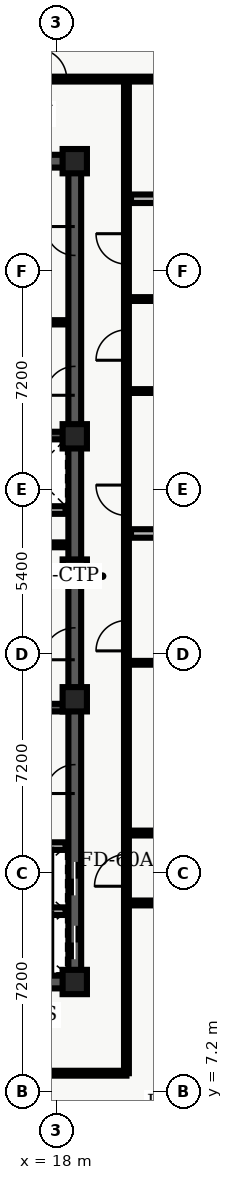
"""IFC4 building model, lengths in metres.
Left out: names, types, materials, properties, quantities, classifications, styles, units other than length and angle.
Written with IfcOpenShell. Run it as: python <this file> out.ifc"""

import sys

from ifc_helpers import new_model, entity, si_unit, converted_unit, direction, frame, origin_with_axes, origin_2d_with_axis, place, context, subcontext, project, spatial, polyline, rectangle, outline, extrude, element, fill, save


model = new_model("IFC4")
c1 = context("Model", 3, precision=1e-05, world=origin_with_axes(), true_north=direction((0.0, 1.0)))
c2 = subcontext(c1, "Body", "Model", "MODEL_VIEW")
j1 = project(units=[si_unit("LENGTHUNIT", "METRE"), converted_unit("PLANEANGLEUNIT", "DEGREE", entity("IfcPlaneAngleMeasure", 0.017), si_unit("PLANEANGLEUNIT", "RADIAN"), dimensions=[0, 0, 0, 0, 0, 0, 0])], contexts=[c1])
p1 = place(None, origin_with_axes())
s1 = spatial("IfcSite", under=j1, at=p1, CompositionType="ELEMENT")
p2 = place(p1, origin_with_axes())
s2 = spatial("IfcBuilding", under=s1, at=p2, CompositionType="ELEMENT")
p3 = place(p2, frame((0.0, 0.0, 276.3), z_axis=(0.0, 0.0, 1.0), x_axis=(1.0, 0.0, 0.0)))
s3 = spatial("IfcBuildingStorey", under=s2, at=p3, CompositionType="ELEMENT", Elevation=276.3)
p4 = place(p3, frame((11.4, 10.8, 0.0), z_axis=(0.0, 0.0, 1.0), x_axis=(1.0, 0.0, 0.0)))
e1 = element("IfcWall", 1, at=p4, inside=s3, PredefinedType="SHEAR", context=c2, shape_type="SweptSolid", body=[
    extrude(outline(polyline([(0.0, -0.21), (7.2, -0.21), (7.2, 0.21), (0.0, 0.21), (0.0, -0.21)])), origin_with_axes(), (0.0, 0.0, 1.0), 3.66),
])
p5 = place(p4, frame((2.625, 0.0, 0.0), z_axis=(0.0, 0.0, 1.0), x_axis=(1.0, 0.0, 0.0)))
e2 = element("IfcOpeningElement", 2, at=p5, cuts=e1, PredefinedType="OPENING", context=c2, shape_type="SweptSolid", body=[
    extrude(rectangle(XDim=1.05, YDim=0.44, at=origin_2d_with_axis()), origin_with_axes(), (0.0, 0.0, 1.0), 2.15),
])
p6 = place(p3, frame((11.4, 37.8, 0.0), z_axis=(0.0, 0.0, 1.0), x_axis=(1.0, 0.0, 0.0)))
e3 = element("IfcWall", 3, at=p6, inside=s3, PredefinedType="SHEAR", context=c2, shape_type="SweptSolid", body=[
    extrude(outline(polyline([(0.0, -0.21), (7.2, -0.21), (7.2, 0.21), (0.0, 0.21), (0.0, -0.21)])), origin_with_axes(), (0.0, 0.0, 1.0), 3.66),
])
p7 = place(p6, frame((2.625, 0.0, 0.0), z_axis=(0.0, 0.0, 1.0), x_axis=(1.0, 0.0, 0.0)))
e4 = element("IfcOpeningElement", 4, at=p7, cuts=e3, PredefinedType="OPENING", context=c2, shape_type="SweptSolid", body=[
    extrude(rectangle(XDim=1.05, YDim=0.44, at=origin_2d_with_axis()), origin_with_axes(), (0.0, 0.0, 1.0), 2.15),
])
p8 = place(p3, frame((18.6, 10.8, 0.0), z_axis=(0.0, 0.0, 1.0), x_axis=(0.0, 1.0, 0.0)))
e5 = element("IfcWall", 5, at=p8, inside=s3, PredefinedType="SHEAR", context=c2, shape_type="SweptSolid", body=[
    extrude(outline(polyline([(0.0, -0.21), (13.5, -0.21), (13.5, 0.21), (0.0, 0.21), (0.0, -0.21)])), origin_with_axes(), (0.0, 0.0, 1.0), 3.66),
])
p9 = place(p8, frame((1.3, 0.0, 0.0), z_axis=(0.0, 0.0, 1.0), x_axis=(1.0, 0.0, 0.0)))
e6 = element("IfcOpeningElement", 6, at=p9, cuts=e5, PredefinedType="OPENING", context=c2, shape_type="SweptSolid", body=[
    extrude(rectangle(XDim=1.1, YDim=0.44, at=origin_2d_with_axis()), origin_with_axes(), (0.0, 0.0, 1.0), 2.15),
])
p10 = place(p8, frame((3.4, 0.0, 0.0), z_axis=(0.0, 0.0, 1.0), x_axis=(1.0, 0.0, 0.0)))
e7 = element("IfcOpeningElement", 7, at=p10, cuts=e5, PredefinedType="OPENING", context=c2, shape_type="SweptSolid", body=[
    extrude(rectangle(XDim=1.1, YDim=0.44, at=origin_2d_with_axis()), origin_with_axes(), (0.0, 0.0, 1.0), 2.15),
])
p11 = place(p8, frame((11.125, 0.0, 0.0), z_axis=(0.0, 0.0, 1.0), x_axis=(1.0, 0.0, 0.0)))
e8 = element("IfcOpeningElement", 8, at=p11, cuts=e5, PredefinedType="OPENING", context=c2, shape_type="SweptSolid", body=[
    extrude(rectangle(XDim=1.05, YDim=0.44, at=origin_2d_with_axis()), origin_with_axes(), (0.0, 0.0, 1.0), 2.15),
])
p12 = place(p8, frame((6.675, 0.0, 0.0), z_axis=(0.0, 0.0, 1.0), x_axis=(1.0, 0.0, 0.0)))
e9 = element("IfcOpeningElement", 9, at=p12, cuts=e5, PredefinedType="OPENING", context=c2, shape_type="SweptSolid", body=[
    extrude(rectangle(XDim=0.95, YDim=0.44, at=origin_2d_with_axis()), origin_with_axes(), (0.0, 0.0, 1.0), 2.15),
])
p13 = place(p3, frame((18.6, 24.3, 0.0), z_axis=(0.0, 0.0, 1.0), x_axis=(0.0, 1.0, 0.0)))
e10 = element("IfcWall", 10, at=p13, inside=s3, PredefinedType="SHEAR", context=c2, shape_type="SweptSolid", body=[
    extrude(outline(polyline([(0.0, -0.21), (13.5, -0.21), (13.5, 0.21), (0.0, 0.21), (0.0, -0.21)])), origin_with_axes(), (0.0, 0.0, 1.0), 3.66),
])
p14 = place(p13, frame((6.275, 0.0, 0.0), z_axis=(0.0, 0.0, 1.0), x_axis=(1.0, 0.0, 0.0)))
e11 = element("IfcOpeningElement", 11, at=p14, cuts=e10, PredefinedType="OPENING", context=c2, shape_type="SweptSolid", body=[
    extrude(rectangle(XDim=0.95, YDim=0.44, at=origin_2d_with_axis()), origin_with_axes(), (0.0, 0.0, 1.0), 2.15),
])
p15 = place(p13, frame((10.875, 0.0, 0.0), z_axis=(0.0, 0.0, 1.0), x_axis=(1.0, 0.0, 0.0)))
e12 = element("IfcOpeningElement", 12, at=p15, cuts=e10, PredefinedType="OPENING", context=c2, shape_type="SweptSolid", body=[
    extrude(rectangle(XDim=0.95, YDim=0.44, at=origin_2d_with_axis()), origin_with_axes(), (0.0, 0.0, 1.0), 2.15),
])
for number, where, z_axis, x_axis in (
    (13, (11.61, 19.825, 0.0), (0.0, 0.0, 1.0), (1.0, 0.0, 0.0)),
    (14, (11.61, 28.775, 0.0), (0.0, 0.0, 1.0), (1.0, 0.0, 0.0)),
):
    element("IfcWall", number, at=place(p3, frame(where, z_axis=z_axis, x_axis=x_axis)), inside=s3, PredefinedType="SHEAR", context=c2, shape_type="SweptSolid", body=[
        extrude(outline(polyline([(0.0, -0.125), (6.78, -0.125), (6.78, 0.125), (0.0, 0.125), (0.0, -0.125)])), origin_with_axes(), (0.0, 0.0, 1.0), 3.66),
    ])
p16 = place(p3, frame((11.7, 24.1, 0.0), z_axis=(0.0, 0.0, 1.0), x_axis=(1.0, 0.0, 0.0)))
e15 = element("IfcWall", 15, at=p16, inside=s3, PredefinedType="SOLIDWALL", context=c2, shape_type="SweptSolid", body=[
    extrude(outline(polyline([(0.0, -0.125), (6.6, -0.125), (6.6, 0.125), (0.0, 0.125), (0.0, -0.125)])), origin_with_axes(), (0.0, 0.0, 1.0), 2.7),
])
p17 = place(p16, frame((3.75, 0.0, 0.0), z_axis=(0.0, 0.0, 1.0), x_axis=(1.0, 0.0, 0.0)))
e16 = element("IfcOpeningElement", 16, at=p17, cuts=e15, PredefinedType="OPENING", context=c2, shape_type="SweptSolid", body=[
    extrude(rectangle(XDim=0.9, YDim=0.27, at=origin_2d_with_axis()), origin_with_axes(), (0.0, 0.0, 1.0), 2.15),
])
p18 = place(p3, frame((11.7, 26.325, 0.0), z_axis=(0.0, 0.0, 1.0), x_axis=(1.0, 0.0, 0.0)))
e17 = element("IfcWall", 17, at=p18, inside=s3, PredefinedType="SOLIDWALL", context=c2, shape_type="SweptSolid", body=[
    extrude(outline(polyline([(0.0, -0.125), (6.6, -0.125), (6.6, 0.125), (0.0, 0.125), (0.0, -0.125)])), origin_with_axes(), (0.0, 0.0, 1.0), 2.7),
])
p19 = place(p18, frame((3.5, 0.0, 0.0), z_axis=(0.0, 0.0, 1.0), x_axis=(1.0, 0.0, 0.0)))
e18 = element("IfcOpeningElement", 18, at=p19, cuts=e17, PredefinedType="OPENING", context=c2, shape_type="SweptSolid", body=[
    extrude(rectangle(XDim=0.9, YDim=0.27, at=origin_2d_with_axis()), origin_with_axes(), (0.0, 0.0, 1.0), 2.15),
])
for number, where, z_axis, x_axis in (
    (19, (18.6, 10.8, 0.0), (0.0, 0.0, 1.0), (1.0, 0.0, 0.0)),
    (20, (18.6, 20.1, 0.0), (0.0, 0.0, 1.0), (1.0, 0.0, 0.0)),
    (21, (18.6, 24.3, 0.0), (0.0, 0.0, 1.0), (1.0, 0.0, 0.0)),
    (22, (18.6, 28.75, 0.0), (0.0, 0.0, 1.0), (1.0, 0.0, 0.0)),
    (23, (18.6, 37.8, 0.0), (0.0, 0.0, 1.0), (1.0, 0.0, 0.0)),
):
    element("IfcColumn", number, at=place(p3, frame(where, z_axis=z_axis, x_axis=x_axis)), inside=s3, PredefinedType="COLUMN", context=c2, shape_type="SweptSolid", body=[
        extrude(rectangle(XDim=0.8, YDim=0.8, at=origin_2d_with_axis()), origin_with_axes(), (0.0, 0.0, 1.0), 3.9),
    ])
p20 = place(p3, frame((14.62, 25.18, 0.0), z_axis=(0.0, 0.0, 1.0), x_axis=(1.0, 0.0, 0.0)))
e24 = element("IfcWall", 24, at=p20, inside=s3, PredefinedType="PARTITIONING", context=c2, shape_type="SweptSolid", body=[
    extrude(outline(polyline([(0.0, -0.08), (3.68, -0.08), (3.68, 0.08), (0.0, 0.08), (0.0, -0.08)])), origin_with_axes(), (0.0, 0.0, 1.0), 2.7),
])
p21 = place(p20, frame((1.95, 0.0, 0.0), z_axis=(0.0, 0.0, 1.0), x_axis=(1.0, 0.0, 0.0)))
e25 = element("IfcOpeningElement", 25, at=p21, cuts=e24, PredefinedType="OPENING", context=c2, shape_type="SweptSolid", body=[
    extrude(rectangle(XDim=0.9, YDim=0.18, at=origin_2d_with_axis()), origin_with_axes(), (0.0, 0.0, 1.0), 2.15),
])
for number, where, z_axis, x_axis in (
    (26, (15.84, 13.13, 0.0), (0.0, 0.0, 1.0), (1.0, 0.0, 0.0)),
    (27, (15.84, 15.27, 0.0), (0.0, 0.0, 1.0), (1.0, 0.0, 0.0)),
):
    element("IfcWall", number, at=place(p3, frame(where, z_axis=z_axis, x_axis=x_axis)), inside=s3, PredefinedType="SOLIDWALL", context=c2, shape_type="SweptSolid", body=[
        extrude(outline(polyline([(0.0, -0.125), (2.46, -0.125), (2.46, 0.125), (0.0, 0.125), (0.0, -0.125)])), origin_with_axes(), (0.0, 0.0, 1.0), 2.7),
    ])
p22 = place(p3, frame((15.84, 32.5, 0.0), z_axis=(0.0, 0.0, 1.0), x_axis=(1.0, 0.0, 0.0)))
e28 = element("IfcWall", 28, at=p22, inside=s3, PredefinedType="PARTITIONING", context=c2, shape_type="SweptSolid", body=[
    extrude(outline(polyline([(0.0, -0.07), (2.46, -0.07), (2.46, 0.07), (0.0, 0.07), (0.0, -0.07)])), origin_with_axes(), (0.0, 0.0, 1.0), 2.7),
])
p23 = place(p3, frame((8.135, 7.8, 0.0), z_axis=(0.0, 0.0, 1.0), x_axis=(1.0, 0.0, 0.0)))
e29 = element("IfcWall", 29, at=p23, inside=s3, PredefinedType="PARTITIONING", context=c2, shape_type="SweptSolid", body=[
    extrude(outline(polyline([(0.0, -0.08), (12.165, -0.08), (12.165, 0.08), (0.0, 0.08), (0.0, -0.08)])), origin_with_axes(), (0.0, 0.0, 1.0), 2.7),
])
p24 = place(p23, frame((6.065, 0.0, 0.0), z_axis=(0.0, 0.0, 1.0), x_axis=(1.0, 0.0, 0.0)))
e30 = element("IfcOpeningElement", 30, at=p24, cuts=e29, PredefinedType="OPENING", context=c2, shape_type="SweptSolid", body=[
    extrude(rectangle(XDim=1.0, YDim=0.18, at=origin_2d_with_axis()), origin_with_axes(), (0.0, 0.0, 1.0), 2.15),
])
p25 = place(p3, frame((8.135, 40.5, 0.0), z_axis=(0.0, 0.0, 1.0), x_axis=(1.0, 0.0, 0.0)))
e31 = element("IfcWall", 31, at=p25, inside=s3, PredefinedType="PARTITIONING", context=c2, shape_type="SweptSolid", body=[
    extrude(outline(polyline([(0.0, -0.08), (23.93, -0.08), (23.93, 0.08), (0.0, 0.08), (0.0, -0.08)])), origin_with_axes(), (0.0, 0.0, 1.0), 2.7),
])
p26 = place(p25, frame((0.876, 0.0, 0.0), z_axis=(0.0, 0.0, 1.0), x_axis=(1.0, 0.0, 0.0)))
e32 = element("IfcOpeningElement", 32, at=p26, cuts=e31, PredefinedType="OPENING", context=c2, shape_type="SweptSolid", body=[
    extrude(rectangle(XDim=1.0, YDim=0.18, at=origin_2d_with_axis()), origin_with_axes(), (0.0, 0.0, 1.0), 2.15),
])
p27 = place(p25, frame((5.457, 0.0, 0.0), z_axis=(0.0, 0.0, 1.0), x_axis=(1.0, 0.0, 0.0)))
e33 = element("IfcOpeningElement", 33, at=p27, cuts=e31, PredefinedType="OPENING", context=c2, shape_type="SweptSolid", body=[
    extrude(rectangle(XDim=1.0, YDim=0.18, at=origin_2d_with_axis()), origin_with_axes(), (0.0, 0.0, 1.0), 2.15),
])
p28 = place(p25, frame((9.7, 0.0, 0.0), z_axis=(0.0, 0.0, 1.0), x_axis=(1.0, 0.0, 0.0)))
e34 = element("IfcOpeningElement", 34, at=p28, cuts=e31, PredefinedType="OPENING", context=c2, shape_type="SweptSolid", body=[
    extrude(rectangle(XDim=1.0, YDim=0.18, at=origin_2d_with_axis()), origin_with_axes(), (0.0, 0.0, 1.0), 2.15),
])
p29 = place(p3, frame((20.3, 7.8, 0.0), z_axis=(0.0, 0.0, 1.0), x_axis=(0.0, 1.0, 0.0)))
e35 = element("IfcWall", 35, at=p29, inside=s3, PredefinedType="PARTITIONING", context=c2, shape_type="SweptSolid", body=[
    extrude(outline(polyline([(0.0, -0.08), (32.7, -0.08), (32.7, 0.08), (0.0, 0.08), (0.0, -0.08)])), origin_with_axes(), (0.0, 0.0, 1.0), 2.7),
])
p30 = place(p29, frame((14.392, 0.0, 0.0), z_axis=(0.0, 0.0, 1.0), x_axis=(1.0, 0.0, 0.0)))
e36 = element("IfcOpeningElement", 36, at=p30, cuts=e35, PredefinedType="OPENING", context=c2, shape_type="SweptSolid", body=[
    extrude(rectangle(XDim=1.0, YDim=0.18, at=origin_2d_with_axis()), origin_with_axes(), (0.0, 0.0, 1.0), 2.15),
])
p31 = place(p29, frame((18.846, 0.0, 0.0), z_axis=(0.0, 0.0, 1.0), x_axis=(1.0, 0.0, 0.0)))
e37 = element("IfcOpeningElement", 37, at=p31, cuts=e35, PredefinedType="OPENING", context=c2, shape_type="SweptSolid", body=[
    extrude(rectangle(XDim=1.0, YDim=0.18, at=origin_2d_with_axis()), origin_with_axes(), (0.0, 0.0, 1.0), 2.15),
])
p32 = place(p29, frame((23.952, 0.0, 0.0), z_axis=(0.0, 0.0, 1.0), x_axis=(1.0, 0.0, 0.0)))
e38 = element("IfcOpeningElement", 38, at=p32, cuts=e35, PredefinedType="OPENING", context=c2, shape_type="SweptSolid", body=[
    extrude(rectangle(XDim=1.0, YDim=0.18, at=origin_2d_with_axis()), origin_with_axes(), (0.0, 0.0, 1.0), 2.15),
])
p33 = place(p29, frame((27.114, 0.0, 0.0), z_axis=(0.0, 0.0, 1.0), x_axis=(1.0, 0.0, 0.0)))
e39 = element("IfcOpeningElement", 39, at=p33, cuts=e35, PredefinedType="OPENING", context=c2, shape_type="SweptSolid", body=[
    extrude(rectangle(XDim=1.0, YDim=0.18, at=origin_2d_with_axis()), origin_with_axes(), (0.0, 0.0, 1.0), 2.15),
])
p34 = place(p29, frame((6.675, 0.0, 0.0), z_axis=(0.0, 0.0, 1.0), x_axis=(1.0, 0.0, 0.0)))
e40 = element("IfcOpeningElement", 40, at=p34, cuts=e35, PredefinedType="OPENING", context=c2, shape_type="SweptSolid", body=[
    extrude(rectangle(XDim=1.05, YDim=0.18, at=origin_2d_with_axis()), origin_with_axes(), (0.0, 0.0, 1.0), 2.15),
])
p35 = place(p3, frame((20.45, 25.554, 0.0), z_axis=(0.0, 0.0, 1.0), x_axis=(1.0, 0.0, 0.0)))
e41 = element("IfcWall", 41, at=p35, inside=s3, PredefinedType="PARTITIONING", context=c2, shape_type="SweptSolid", body=[
    extrude(outline(polyline([(0.0, -0.14), (11.615, -0.14), (11.615, 0.14), (0.0, 0.14), (0.0, -0.14)])), origin_with_axes(), (0.0, 0.0, 1.0), 2.7),
])
for number, where, z_axis, x_axis in (
    (42, (20.45, 30.239, 0.0), (0.0, 0.0, 1.0), (1.0, 0.0, 0.0)),
    (43, (20.45, 33.265, 0.0), (0.0, 0.0, 1.0), (1.0, 0.0, 0.0)),
):
    element("IfcWall", number, at=place(p3, frame(where, z_axis=z_axis, x_axis=x_axis)), inside=s3, PredefinedType="PARTITIONING", context=c2, shape_type="SweptSolid", body=[
        extrude(outline(polyline([(0.0, -0.062), (11.615, -0.062), (11.615, 0.062), (0.0, 0.062), (0.0, -0.062)])), origin_with_axes(), (0.0, 0.0, 1.0), 2.7),
    ])
p36 = place(p3, frame((20.45, 36.564, 0.0), z_axis=(0.0, 0.0, 1.0), x_axis=(1.0, 0.0, 0.0)))
e44 = element("IfcWall", 44, at=p36, inside=s3, PredefinedType="PARTITIONING", context=c2, shape_type="SweptSolid", body=[
    extrude(outline(polyline([(0.0, -0.14), (11.615, -0.14), (11.615, 0.14), (0.0, 0.14), (0.0, -0.14)])), origin_with_axes(), (0.0, 0.0, 1.0), 2.7),
])
p37 = place(p36, frame((5.785, 0.0, 0.0), z_axis=(0.0, 0.0, 1.0), x_axis=(1.0, 0.0, 0.0)))
e45 = element("IfcOpeningElement", 45, at=p37, cuts=e44, PredefinedType="OPENING", context=c2, shape_type="SweptSolid", body=[
    extrude(rectangle(XDim=0.95, YDim=0.3, at=origin_2d_with_axis()), origin_with_axes(), (0.0, 0.0, 1.0), 2.15),
])
p38 = place(p3, frame((20.3, 13.4, 0.0), z_axis=(0.0, 0.0, 1.0), x_axis=(1.0, 0.0, 0.0)))
e46 = element("IfcWall", 46, at=p38, inside=s3, PredefinedType="PARTITIONING", context=c2, shape_type="SweptSolid", body=[
    extrude(outline(polyline([(0.0, -0.08), (15.45, -0.08), (15.45, 0.08), (0.0, 0.08), (0.0, -0.08)])), origin_with_axes(), (0.0, 0.0, 1.0), 2.7),
])
p39 = place(p38, frame((2.34, 0.0, 0.0), z_axis=(0.0, 0.0, 1.0), x_axis=(1.0, 0.0, 0.0)))
e47 = element("IfcOpeningElement", 47, at=p39, cuts=e46, PredefinedType="OPENING", context=c2, shape_type="SweptSolid", body=[
    extrude(rectangle(XDim=1.0, YDim=0.18, at=origin_2d_with_axis()), origin_with_axes(), (0.0, 0.0, 1.0), 2.15),
])
p40 = place(p38, frame((7.011, 0.0, 0.0), z_axis=(0.0, 0.0, 1.0), x_axis=(1.0, 0.0, 0.0)))
e48 = element("IfcOpeningElement", 48, at=p40, cuts=e46, PredefinedType="OPENING", context=c2, shape_type="SweptSolid", body=[
    extrude(rectangle(XDim=1.0, YDim=0.18, at=origin_2d_with_axis()), origin_with_axes(), (0.0, 0.0, 1.0), 2.15),
])
p41 = place(p38, frame((12.445, 0.0, 0.0), z_axis=(0.0, 0.0, 1.0), x_axis=(1.0, 0.0, 0.0)))
e49 = element("IfcOpeningElement", 49, at=p41, cuts=e46, PredefinedType="OPENING", context=c2, shape_type="SweptSolid", body=[
    extrude(rectangle(XDim=1.2, YDim=0.18, at=origin_2d_with_axis()), origin_with_axes(), (0.0, 0.0, 1.0), 2.2),
])
p42 = place(p3, frame((20.3, 15.7, 0.0), z_axis=(0.0, 0.0, 1.0), x_axis=(1.0, 0.0, 0.0)))
e50 = element("IfcWall", 50, at=p42, inside=s3, PredefinedType="PARTITIONING", context=c2, shape_type="SweptSolid", body=[
    extrude(outline(polyline([(0.0, -0.08), (15.45, -0.08), (15.45, 0.08), (0.0, 0.08), (0.0, -0.08)])), origin_with_axes(), (0.0, 0.0, 1.0), 2.7),
])
p43 = place(p42, frame((7.775, 0.0, 0.0), z_axis=(0.0, 0.0, 1.0), x_axis=(1.0, 0.0, 0.0)))
e51 = element("IfcOpeningElement", 51, at=p43, cuts=e50, PredefinedType="OPENING", context=c2, shape_type="SweptSolid", body=[
    extrude(rectangle(XDim=1.0, YDim=0.18, at=origin_2d_with_axis()), origin_with_axes(), (0.0, 0.0, 1.0), 2.15),
])
p44 = place(p3, frame((20.3, 21.3, 0.0), z_axis=(0.0, 0.0, 1.0), x_axis=(1.0, 0.0, 0.0)))
e52 = element("IfcWall", 52, at=p44, inside=s3, PredefinedType="PARTITIONING", context=c2, shape_type="SweptSolid", body=[
    extrude(outline(polyline([(0.0, -0.062), (11.765, -0.062), (11.765, 0.062), (0.0, 0.062), (0.0, -0.062)])), origin_with_axes(), (0.0, 0.0, 1.0), 2.7),
])
p45 = place(p8, frame((1.3, 0.0, 0.0), z_axis=(0.0, 0.0, 1.0), x_axis=(1.0, 0.0, 0.0)))
e53 = element("IfcDoor", 53, at=p45, inside=s3, OperationType="SLIDING_TO_LEFT", PredefinedType="DOOR", context=c2, shape_type="SweptSolid", body=[
    extrude(rectangle(XDim=1.1, YDim=0.09, at=origin_2d_with_axis()), origin_with_axes(), (0.0, 0.0, 1.0), 2.15),
])
fill(e6, e53)
p46 = place(p8, frame((3.4, 0.0, 0.0), z_axis=(0.0, 0.0, 1.0), x_axis=(1.0, 0.0, 0.0)))
e54 = element("IfcDoor", 54, at=p46, inside=s3, OperationType="SLIDING_TO_RIGHT", PredefinedType="DOOR", context=c2, shape_type="SweptSolid", body=[
    extrude(rectangle(XDim=1.1, YDim=0.09, at=origin_2d_with_axis()), origin_with_axes(), (0.0, 0.0, 1.0), 2.15),
])
fill(e7, e54)
p47 = place(p8, frame((11.125, 0.0, 0.0), z_axis=(0.0, 0.0, 1.0), x_axis=(1.0, 0.0, 0.0)))
e55 = element("IfcDoor", 55, at=p47, inside=s3, OperationType="SINGLE_SWING_LEFT", PredefinedType="DOOR", context=c2, shape_type="SweptSolid", body=[
    extrude(rectangle(XDim=1.05, YDim=0.09, at=origin_2d_with_axis()), origin_with_axes(), (0.0, 0.0, 1.0), 2.15),
])
fill(e8, e55)
p48 = place(p8, frame((6.675, 0.0, 0.0), z_axis=(0.0, 0.0, 1.0), x_axis=(1.0, 0.0, 0.0)))
e56 = element("IfcDoor", 56, at=p48, inside=s3, OperationType="SINGLE_SWING_LEFT", PredefinedType="DOOR", context=c2, shape_type="SweptSolid", body=[
    extrude(rectangle(XDim=0.95, YDim=0.09, at=origin_2d_with_axis()), origin_with_axes(), (0.0, 0.0, 1.0), 2.15),
])
fill(e9, e56)
p49 = place(p13, frame((6.275, 0.0, 0.0), z_axis=(0.0, 0.0, 1.0), x_axis=(1.0, 0.0, 0.0)))
e57 = element("IfcDoor", 57, at=p49, inside=s3, OperationType="SINGLE_SWING_LEFT", PredefinedType="DOOR", context=c2, shape_type="SweptSolid", body=[
    extrude(rectangle(XDim=0.95, YDim=0.09, at=origin_2d_with_axis()), origin_with_axes(), (0.0, 0.0, 1.0), 2.15),
])
fill(e11, e57)
p50 = place(p13, frame((10.875, 0.0, 0.0), z_axis=(0.0, 0.0, 1.0), x_axis=(1.0, 0.0, 0.0)))
e58 = element("IfcDoor", 58, at=p50, inside=s3, OperationType="SINGLE_SWING_RIGHT", PredefinedType="DOOR", context=c2, shape_type="SweptSolid", body=[
    extrude(rectangle(XDim=0.95, YDim=0.09, at=origin_2d_with_axis()), origin_with_axes(), (0.0, 0.0, 1.0), 2.15),
])
fill(e12, e58)
p51 = place(p25, frame((9.7, 0.0, 0.0), z_axis=(0.0, 0.0, 1.0), x_axis=(1.0, 0.0, 0.0)))
e59 = element("IfcDoor", 59, at=p51, inside=s3, OperationType="SINGLE_SWING_LEFT", PredefinedType="DOOR", context=c2, shape_type="SweptSolid", body=[
    extrude(rectangle(XDim=1.0, YDim=0.09, at=origin_2d_with_axis()), origin_with_axes(), (0.0, 0.0, 1.0), 2.15),
])
fill(e34, e59)
p52 = place(p29, frame((14.392, 0.0, 0.0), z_axis=(0.0, 0.0, 1.0), x_axis=(1.0, 0.0, 0.0)))
e60 = element("IfcDoor", 60, at=p52, inside=s3, OperationType="SINGLE_SWING_LEFT", PredefinedType="DOOR", context=c2, shape_type="SweptSolid", body=[
    extrude(rectangle(XDim=1.0, YDim=0.09, at=origin_2d_with_axis()), origin_with_axes(), (0.0, 0.0, 1.0), 2.15),
])
fill(e36, e60)
p53 = place(p29, frame((18.846, 0.0, 0.0), z_axis=(0.0, 0.0, 1.0), x_axis=(1.0, 0.0, 0.0)))
e61 = element("IfcDoor", 61, at=p53, inside=s3, OperationType="SINGLE_SWING_RIGHT", PredefinedType="DOOR", context=c2, shape_type="SweptSolid", body=[
    extrude(rectangle(XDim=1.0, YDim=0.09, at=origin_2d_with_axis()), origin_with_axes(), (0.0, 0.0, 1.0), 2.15),
])
fill(e37, e61)
p54 = place(p29, frame((23.952, 0.0, 0.0), z_axis=(0.0, 0.0, 1.0), x_axis=(1.0, 0.0, 0.0)))
e62 = element("IfcDoor", 62, at=p54, inside=s3, OperationType="SINGLE_SWING_LEFT", PredefinedType="DOOR", context=c2, shape_type="SweptSolid", body=[
    extrude(rectangle(XDim=1.0, YDim=0.09, at=origin_2d_with_axis()), origin_with_axes(), (0.0, 0.0, 1.0), 2.15),
])
fill(e38, e62)
p55 = place(p29, frame((27.114, 0.0, 0.0), z_axis=(0.0, 0.0, 1.0), x_axis=(1.0, 0.0, 0.0)))
e63 = element("IfcDoor", 63, at=p55, inside=s3, OperationType="SINGLE_SWING_RIGHT", PredefinedType="DOOR", context=c2, shape_type="SweptSolid", body=[
    extrude(rectangle(XDim=1.0, YDim=0.09, at=origin_2d_with_axis()), origin_with_axes(), (0.0, 0.0, 1.0), 2.15),
])
fill(e39, e63)
p56 = place(p29, frame((6.675, 0.0, 0.0), z_axis=(0.0, 0.0, 1.0), x_axis=(1.0, 0.0, 0.0)))
e64 = element("IfcDoor", 64, at=p56, inside=s3, OperationType="SINGLE_SWING_LEFT", PredefinedType="DOOR", context=c2, shape_type="SweptSolid", body=[
    extrude(rectangle(XDim=1.05, YDim=0.09, at=origin_2d_with_axis()), origin_with_axes(), (0.0, 0.0, 1.0), 2.15),
])
fill(e40, e64)
save(model, sys.argv[1])
